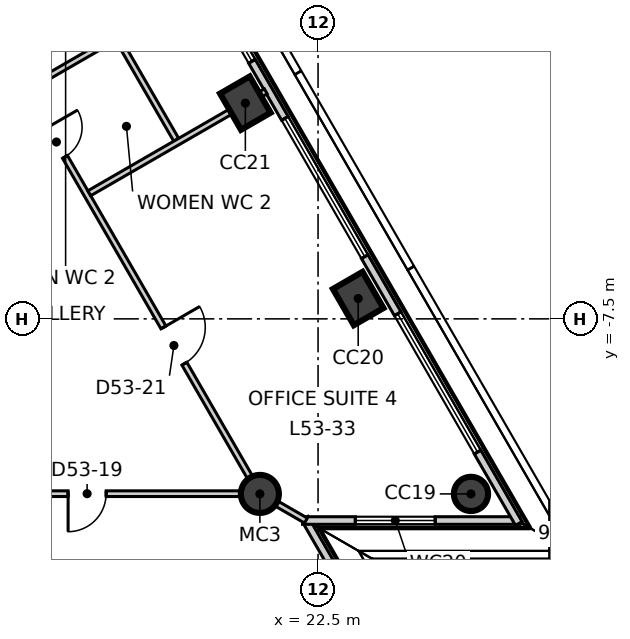
"""IFC4 building model, lengths in metres.
Left out: names, types, materials, properties, quantities, classifications, styles, units other than length and angle.
Written with IfcOpenShell. Run it as: python <this file> out.ifc"""

import sys

from ifc_helpers import new_model, si_unit, direction, frame, frame_2d, origin, origin_2d, place, context, subcontext, project, spatial, rectangle, circle, extrude, element, fill, save


model = new_model("IFC4")
c1 = context("Model", 3, precision=1e-05, world=origin(), true_north=direction((0.0, 1.0)))
c2 = subcontext(c1, "Body", "Model", "MODEL_VIEW")
j1 = project(units=[si_unit("LENGTHUNIT", "METRE"), si_unit("PLANEANGLEUNIT", "RADIAN")], contexts=[c1])
p1 = place(None, origin())
s1 = spatial("IfcSite", under=j1, at=p1, CompositionType="ELEMENT")
p2 = place(p1, origin())
s2 = spatial("IfcBuilding", under=s1, at=p2, CompositionType="ELEMENT")
p3 = place(p2, frame((0.0, 0.0, 227.3)))
s3 = spatial("IfcBuildingStorey", under=s2, at=p3, CompositionType="ELEMENT", Elevation=227.3)
p4 = place(p3, frame((26.524, -12.106, -0.3), z_axis=(0.0, 0.0, 1.0), x_axis=(-0.5, 0.866025403784, 0.0)))
e1 = element("IfcColumn", 1, at=p4, inside=s3, PredefinedType="COLUMN", context=c2, shape_type="SweptSolid", body=[
    extrude(circle(Radius=0.45, at=origin_2d()), origin(), (0.0, 0.0, 1.0), 4.0),
])
for number, where, z_axis, x_axis in (
    (2, (23.556, -6.965, -0.3), (0.0, 0.0, 1.0), (-0.5, 0.866, 0.0)),
    (3, (20.587, -1.824, -0.3), (0.0, 0.0, 1.0), (-0.5, 0.866, 0.0)),
):
    element("IfcColumn", number, at=place(p3, frame(where, z_axis=z_axis, x_axis=x_axis)), inside=s3, PredefinedType="COLUMN", context=c2, shape_type="SweptSolid", body=[
        extrude(rectangle(XDim=1.1, YDim=0.9, at=origin_2d()), origin(), (0.0, 0.0, 1.0), 4.0),
    ])
p5 = place(p3, frame((20.969, -12.106, -0.3), z_axis=(0.0, 0.0, 1.0), x_axis=(1.0, 0.0, 0.0)))
e4 = element("IfcColumn", 4, at=p5, inside=s3, PredefinedType="COLUMN", context=c2, shape_type="SweptSolid", body=[
    extrude(circle(Radius=0.5, at=origin_2d()), origin(), (0.0, 0.0, 1.0), 4.0),
])
p6 = place(p3, frame((25.004, -17.695, 0.0), z_axis=(0.0, 0.0, 1.0), x_axis=(-0.49987899677, 0.866095253761, 0.0)))
e5 = element("IfcWall", 5, at=p6, inside=s3, PredefinedType="ELEMENTEDWALL", context=c2, shape_type="SweptSolid", body=[
    extrude(rectangle(XDim=5.715, YDim=0.2, at=frame_2d((2.858, 0.0))), origin(), (0.0, 0.0, 1.0), 3.7),
])
p7 = place(p6, frame((1.99, 0.0, 0.9)))
e6 = element("IfcOpeningElement", 6, at=p7, cuts=e5, PredefinedType="OPENING", context=c2, shape_type="SweptSolid", body=[
    extrude(rectangle(XDim=2.1, YDim=2.5, at=frame_2d((1.05, 1.25))), frame((0.0, 0.11, 0.0), z_axis=(0.0, -1.0, 0.0), x_axis=(1.0, 0.0, 0.0)), (0.0, 0.0, 1.0), 0.22),
])
p8 = place(p3, frame((22.092, -12.806, 0.0), z_axis=(0.0, 0.0, 1.0), x_axis=(1.0, 0.0, 0.0)))
e7 = element("IfcWall", 7, at=p8, inside=s3, PredefinedType="ELEMENTEDWALL", context=c2, shape_type="SweptSolid", body=[
    extrude(rectangle(XDim=5.715, YDim=0.2, at=frame_2d((2.857, 0.0))), origin(), (0.0, 0.0, 1.0), 3.7),
])
p9 = place(p8, frame((1.39, 0.0, 0.9)))
e8 = element("IfcOpeningElement", 8, at=p9, cuts=e7, PredefinedType="OPENING", context=c2, shape_type="SweptSolid", body=[
    extrude(rectangle(XDim=2.1, YDim=2.5, at=frame_2d((1.05, 1.25))), frame((0.0, 0.11, 0.0), z_axis=(0.0, -1.0, 0.0), x_axis=(1.0, 0.0, 0.0)), (0.0, 0.0, 1.0), 0.22),
])
p10 = place(p3, frame((27.782, -12.884, 0.0), z_axis=(0.0, 0.0, 1.0), x_axis=(-0.500023345841, 0.866011924637, 0.0)))
e9 = element("IfcWall", 9, at=p10, inside=s3, PredefinedType="ELEMENTEDWALL", context=c2, shape_type="SweptSolid", body=[
    extrude(rectangle(XDim=50.078, YDim=0.2, at=frame_2d((25.039, 0.0))), origin(), (0.0, 0.0, 1.0), 3.7),
])
p11 = place(p10, frame((2.171, 0.0, 0.9)))
e10 = element("IfcOpeningElement", 10, at=p11, cuts=e9, PredefinedType="OPENING", context=c2, shape_type="SweptSolid", body=[
    extrude(rectangle(XDim=4.2, YDim=2.5, at=frame_2d((2.1, 1.25))), frame((0.0, 0.11, 0.0), z_axis=(0.0, -1.0, 0.0), x_axis=(1.0, 0.0, 0.0)), (0.0, 0.0, 1.0), 0.22),
])
p12 = place(p10, frame((8.108, 0.0, 0.9)))
e11 = element("IfcOpeningElement", 11, at=p12, cuts=e9, PredefinedType="OPENING", context=c2, shape_type="SweptSolid", body=[
    extrude(rectangle(XDim=4.2, YDim=2.5, at=frame_2d((2.1, 1.25))), frame((0.0, 0.11, 0.0), z_axis=(0.0, -1.0, 0.0), x_axis=(1.0, 0.0, 0.0)), (0.0, 0.0, 1.0), 0.22),
])
p13 = place(p10, frame((14.044, 0.0, 0.9)))
e12 = element("IfcOpeningElement", 12, at=p13, cuts=e9, PredefinedType="OPENING", context=c2, shape_type="SweptSolid", body=[
    extrude(rectangle(XDim=4.2, YDim=2.5, at=frame_2d((2.1, 1.25))), frame((0.0, 0.11, 0.0), z_axis=(0.0, -1.0, 0.0), x_axis=(1.0, 0.0, 0.0)), (0.0, 0.0, 1.0), 0.22),
])
p14 = place(p10, frame((19.981, 0.0, 0.9)))
e13 = element("IfcOpeningElement", 13, at=p14, cuts=e9, PredefinedType="OPENING", context=c2, shape_type="SweptSolid", body=[
    extrude(rectangle(XDim=4.2, YDim=2.5, at=frame_2d((2.1, 1.25))), frame((0.0, 0.11, 0.0), z_axis=(0.0, -1.0, 0.0), x_axis=(1.0, 0.0, 0.0)), (0.0, 0.0, 1.0), 0.22),
])
p15 = place(p10, frame((25.917, 0.0, 0.9)))
e14 = element("IfcOpeningElement", 14, at=p15, cuts=e9, PredefinedType="OPENING", context=c2, shape_type="SweptSolid", body=[
    extrude(rectangle(XDim=4.2, YDim=2.5, at=frame_2d((2.1, 1.25))), frame((0.0, 0.11, 0.0), z_axis=(0.0, -1.0, 0.0), x_axis=(1.0, 0.0, 0.0)), (0.0, 0.0, 1.0), 0.22),
])
p16 = place(p10, frame((31.854, 0.0, 0.9)))
e15 = element("IfcOpeningElement", 15, at=p16, cuts=e9, PredefinedType="OPENING", context=c2, shape_type="SweptSolid", body=[
    extrude(rectangle(XDim=4.2, YDim=2.5, at=frame_2d((2.1, 1.25))), frame((0.0, 0.11, 0.0), z_axis=(0.0, -1.0, 0.0), x_axis=(1.0, 0.0, 0.0)), (0.0, 0.0, 1.0), 0.22),
])
p17 = place(p10, frame((37.79, 0.0, 0.9)))
e16 = element("IfcOpeningElement", 16, at=p17, cuts=e9, PredefinedType="OPENING", context=c2, shape_type="SweptSolid", body=[
    extrude(rectangle(XDim=4.2, YDim=2.5, at=frame_2d((2.1, 1.25))), frame((0.0, 0.11, 0.0), z_axis=(0.0, -1.0, 0.0), x_axis=(1.0, 0.0, 0.0)), (0.0, 0.0, 1.0), 0.22),
])
p18 = place(p10, frame((43.727, 0.0, 0.9)))
e17 = element("IfcOpeningElement", 17, at=p18, cuts=e9, PredefinedType="OPENING", context=c2, shape_type="SweptSolid", body=[
    extrude(rectangle(XDim=4.2, YDim=2.5, at=frame_2d((2.1, 1.25))), frame((0.0, 0.11, 0.0), z_axis=(0.0, -1.0, 0.0), x_axis=(1.0, 0.0, 0.0)), (0.0, 0.0, 1.0), 0.22),
])
p19 = place(p3, frame((-20.808, -12.1, 0.0), z_axis=(0.0, 0.0, 1.0), x_axis=(1.0, 0.0, 0.0)))
e18 = element("IfcWall", 18, at=p19, inside=s3, PredefinedType="PARTITIONING", context=c2, shape_type="SweptSolid", body=[
    extrude(rectangle(XDim=41.766, YDim=0.15, at=frame_2d((20.883, 0.0))), origin(), (0.0, 0.0, 1.0), 3.7),
])
p20 = place(p19, frame((3.8, 0.0, 0.0)))
e19 = element("IfcOpeningElement", 19, at=p20, cuts=e18, PredefinedType="OPENING", context=c2, shape_type="SweptSolid", body=[
    extrude(rectangle(XDim=1.1, YDim=2.1, at=frame_2d((0.55, 1.05))), frame((0.0, 0.085, 0.0), z_axis=(0.0, -1.0, 0.0), x_axis=(1.0, 0.0, 0.0)), (0.0, 0.0, 1.0), 0.17),
])
p21 = place(p19, frame((18.685, 0.0, 0.0)))
e20 = element("IfcOpeningElement", 20, at=p21, cuts=e18, PredefinedType="OPENING", context=c2, shape_type="SweptSolid", body=[
    extrude(rectangle(XDim=1.1, YDim=2.1, at=frame_2d((0.55, 1.05))), frame((0.0, 0.085, 0.0), z_axis=(0.0, -1.0, 0.0), x_axis=(1.0, 0.0, 0.0)), (0.0, 0.0, 1.0), 0.17),
])
p22 = place(p19, frame((10.085, 0.0, 0.0)))
e21 = element("IfcOpeningElement", 21, at=p22, cuts=e18, PredefinedType="OPENING", context=c2, shape_type="SweptSolid", body=[
    extrude(rectangle(XDim=0.9, YDim=2.1, at=frame_2d((0.45, 1.05))), frame((0.0, 0.085, 0.0), z_axis=(0.0, -1.0, 0.0), x_axis=(1.0, 0.0, 0.0)), (0.0, 0.0, 1.0), 0.17),
])
p23 = place(p19, frame((13.285, 0.0, 0.0)))
e22 = element("IfcOpeningElement", 22, at=p23, cuts=e18, PredefinedType="OPENING", context=c2, shape_type="SweptSolid", body=[
    extrude(rectangle(XDim=0.9, YDim=2.1, at=frame_2d((0.45, 1.05))), frame((0.0, 0.085, 0.0), z_axis=(0.0, -1.0, 0.0), x_axis=(1.0, 0.0, 0.0)), (0.0, 0.0, 1.0), 0.17),
])
p24 = place(p19, frame((15.985, 0.0, 0.0)))
e23 = element("IfcOpeningElement", 23, at=p24, cuts=e18, PredefinedType="OPENING", context=c2, shape_type="SweptSolid", body=[
    extrude(rectangle(XDim=1.0, YDim=2.1, at=frame_2d((0.5, 1.05))), frame((0.0, 0.085, 0.0), z_axis=(0.0, -1.0, 0.0), x_axis=(1.0, 0.0, 0.0)), (0.0, 0.0, 1.0), 0.17),
])
p25 = place(p19, frame((29.158, 0.0, 0.0)))
e24 = element("IfcOpeningElement", 24, at=p25, cuts=e18, PredefinedType="OPENING", context=c2, shape_type="SweptSolid", body=[
    extrude(rectangle(XDim=1.1, YDim=2.1, at=frame_2d((0.55, 1.05))), frame((0.0, 0.085, 0.0), z_axis=(0.0, -1.0, 0.0), x_axis=(1.0, 0.0, 0.0)), (0.0, 0.0, 1.0), 0.17),
])
p26 = place(p19, frame((22.158, 0.0, 0.0)))
e25 = element("IfcOpeningElement", 25, at=p26, cuts=e18, PredefinedType="OPENING", context=c2, shape_type="SweptSolid", body=[
    extrude(rectangle(XDim=0.9, YDim=2.1, at=frame_2d((0.45, 1.05))), frame((0.0, 0.085, 0.0), z_axis=(0.0, -1.0, 0.0), x_axis=(1.0, 0.0, 0.0)), (0.0, 0.0, 1.0), 0.17),
])
p27 = place(p19, frame((25.158, 0.0, 0.0)))
e26 = element("IfcOpeningElement", 26, at=p27, cuts=e18, PredefinedType="OPENING", context=c2, shape_type="SweptSolid", body=[
    extrude(rectangle(XDim=0.9, YDim=2.1, at=frame_2d((0.45, 1.05))), frame((0.0, 0.085, 0.0), z_axis=(0.0, -1.0, 0.0), x_axis=(1.0, 0.0, 0.0)), (0.0, 0.0, 1.0), 0.17),
])
p28 = place(p19, frame((36.731, 0.0, 0.0)))
e27 = element("IfcOpeningElement", 27, at=p28, cuts=e18, PredefinedType="OPENING", context=c2, shape_type="SweptSolid", body=[
    extrude(rectangle(XDim=1.0, YDim=2.1, at=frame_2d((0.5, 1.05))), frame((0.0, 0.085, 0.0), z_axis=(0.0, -1.0, 0.0), x_axis=(1.0, 0.0, 0.0)), (0.0, 0.0, 1.0), 0.17),
])
p29 = place(p3, frame((21.086, -12.175, 0.0), z_axis=(0.0, 0.0, 1.0), x_axis=(0.866143786764, -0.499794898583, 0.0)))
e28 = element("IfcWall", 28, at=p29, inside=s3, PredefinedType="PARTITIONING", context=c2, shape_type="SweptSolid", body=[
    extrude(rectangle(XDim=1.264, YDim=0.15, at=frame_2d((0.632, 0.0))), origin(), (0.0, 0.0, 1.0), 3.7),
])
p30 = place(p3, frame((0.075, 24.07, 0.0), z_axis=(0.0, 0.0, 1.0), x_axis=(0.49999939571, -0.866025752671, 0.0)))
e29 = element("IfcWall", 29, at=p30, inside=s3, PredefinedType="PARTITIONING", context=c2, shape_type="SweptSolid", body=[
    extrude(rectangle(XDim=41.614, YDim=0.15, at=frame_2d((20.807, 0.0))), origin(), (0.0, 0.0, 1.0), 3.7),
])
p31 = place(p30, frame((36.714, 0.0, 0.0)))
e30 = element("IfcOpeningElement", 30, at=p31, cuts=e29, PredefinedType="OPENING", context=c2, shape_type="SweptSolid", body=[
    extrude(rectangle(XDim=1.1, YDim=2.1, at=frame_2d((0.55, 1.05))), frame((0.0, 0.085, 0.0), z_axis=(0.0, -1.0, 0.0), x_axis=(1.0, 0.0, 0.0)), (0.0, 0.0, 1.0), 0.17),
])
p32 = place(p30, frame((21.831, 0.0, 0.0)))
e31 = element("IfcOpeningElement", 31, at=p32, cuts=e29, PredefinedType="OPENING", context=c2, shape_type="SweptSolid", body=[
    extrude(rectangle(XDim=1.1, YDim=2.1, at=frame_2d((0.55, 1.05))), frame((0.0, 0.085, 0.0), z_axis=(0.0, -1.0, 0.0), x_axis=(1.0, 0.0, 0.0)), (0.0, 0.0, 1.0), 0.17),
])
p33 = place(p30, frame((30.631, 0.0, 0.0)))
e32 = element("IfcOpeningElement", 32, at=p33, cuts=e29, PredefinedType="OPENING", context=c2, shape_type="SweptSolid", body=[
    extrude(rectangle(XDim=0.9, YDim=2.1, at=frame_2d((0.45, 1.05))), frame((0.0, 0.085, 0.0), z_axis=(0.0, -1.0, 0.0), x_axis=(1.0, 0.0, 0.0)), (0.0, 0.0, 1.0), 0.17),
])
p34 = place(p30, frame((27.431, 0.0, 0.0)))
e33 = element("IfcOpeningElement", 33, at=p34, cuts=e29, PredefinedType="OPENING", context=c2, shape_type="SweptSolid", body=[
    extrude(rectangle(XDim=0.9, YDim=2.1, at=frame_2d((0.45, 1.05))), frame((0.0, 0.085, 0.0), z_axis=(0.0, -1.0, 0.0), x_axis=(1.0, 0.0, 0.0)), (0.0, 0.0, 1.0), 0.17),
])
p35 = place(p30, frame((24.631, 0.0, 0.0)))
e34 = element("IfcOpeningElement", 34, at=p35, cuts=e29, PredefinedType="OPENING", context=c2, shape_type="SweptSolid", body=[
    extrude(rectangle(XDim=1.0, YDim=2.1, at=frame_2d((0.5, 1.05))), frame((0.0, 0.085, 0.0), z_axis=(0.0, -1.0, 0.0), x_axis=(1.0, 0.0, 0.0)), (0.0, 0.0, 1.0), 0.17),
])
p36 = place(p30, frame((14.358, 0.0, 0.0)))
e35 = element("IfcOpeningElement", 35, at=p36, cuts=e29, PredefinedType="OPENING", context=c2, shape_type="SweptSolid", body=[
    extrude(rectangle(XDim=1.1, YDim=2.1, at=frame_2d((0.55, 1.05))), frame((0.0, 0.085, 0.0), z_axis=(0.0, -1.0, 0.0), x_axis=(1.0, 0.0, 0.0)), (0.0, 0.0, 1.0), 0.17),
])
p37 = place(p30, frame((3.885, 0.0, 0.0)))
e36 = element("IfcOpeningElement", 36, at=p37, cuts=e29, PredefinedType="OPENING", context=c2, shape_type="SweptSolid", body=[
    extrude(rectangle(XDim=1.1, YDim=2.1, at=frame_2d((0.55, 1.05))), frame((0.0, 0.085, 0.0), z_axis=(0.0, -1.0, 0.0), x_axis=(1.0, 0.0, 0.0)), (0.0, 0.0, 1.0), 0.17),
])
p38 = place(p3, frame((14.404, 4.768, 0.0), z_axis=(0.0, 0.0, 1.0), x_axis=(0.500042162787, -0.86600105972, 0.0)))
e37 = element("IfcWall", 37, at=p38, inside=s3, PredefinedType="PARTITIONING", context=c2, shape_type="SweptSolid", body=[
    extrude(rectangle(XDim=8.725, YDim=0.15, at=frame_2d((4.363, 0.0))), origin(), (0.0, 0.0, 1.0), 3.7),
])
p39 = place(p3, frame((14.88, -1.424, 0.0), z_axis=(0.0, 0.0, 1.0), x_axis=(0.865872279416, 0.500265125447, 0.0)))
e38 = element("IfcWall", 38, at=p39, inside=s3, PredefinedType="PARTITIONING", context=c2, shape_type="SweptSolid", body=[
    extrude(rectangle(XDim=2.609, YDim=0.15, at=frame_2d((1.304, 0.0))), origin(), (0.0, 0.0, 1.0), 3.7),
])
p40 = place(p3, frame((16.48, -4.195, 0.0), z_axis=(0.0, 0.0, 1.0), x_axis=(0.866032438121, 0.499987815973, 0.0)))
e39 = element("IfcWall", 39, at=p40, inside=s3, PredefinedType="PARTITIONING", context=c2, shape_type="SweptSolid", body=[
    extrude(rectangle(XDim=5.363, YDim=0.15, at=frame_2d((2.681, 0.0))), origin(), (0.0, 0.0, 1.0), 3.7),
])
p41 = place(p9, origin())
e40 = element("IfcWindow", 40, at=p41, inside=s3, PartitioningType="SINGLE_PANEL", PredefinedType="WINDOW", context=c2, shape_type="SweptSolid", body=[
    extrude(rectangle(XDim=2.1, YDim=2.5, at=frame_2d((1.05, 1.25))), frame((0.0, 0.03, 0.0), z_axis=(0.0, -1.0, 0.0), x_axis=(1.0, 0.0, 0.0)), (0.0, 0.0, 1.0), 0.06),
])
fill(e8, e40)
p42 = place(p11, origin())
e41 = element("IfcWindow", 41, at=p42, inside=s3, PartitioningType="SINGLE_PANEL", PredefinedType="WINDOW", context=c2, shape_type="SweptSolid", body=[
    extrude(rectangle(XDim=4.2, YDim=2.5, at=frame_2d((2.1, 1.25))), frame((0.0, 0.03, 0.0), z_axis=(0.0, -1.0, 0.0), x_axis=(1.0, 0.0, 0.0)), (0.0, 0.0, 1.0), 0.06),
])
fill(e10, e41)
p43 = place(p12, origin())
e42 = element("IfcWindow", 42, at=p43, inside=s3, PartitioningType="SINGLE_PANEL", PredefinedType="WINDOW", context=c2, shape_type="SweptSolid", body=[
    extrude(rectangle(XDim=4.2, YDim=2.5, at=frame_2d((2.1, 1.25))), frame((0.0, 0.03, 0.0), z_axis=(0.0, -1.0, 0.0), x_axis=(1.0, 0.0, 0.0)), (0.0, 0.0, 1.0), 0.06),
])
fill(e11, e42)
p44 = place(p13, origin())
e43 = element("IfcWindow", 43, at=p44, inside=s3, PartitioningType="SINGLE_PANEL", PredefinedType="WINDOW", context=c2, shape_type="SweptSolid", body=[
    extrude(rectangle(XDim=4.2, YDim=2.5, at=frame_2d((2.1, 1.25))), frame((0.0, 0.03, 0.0), z_axis=(0.0, -1.0, 0.0), x_axis=(1.0, 0.0, 0.0)), (0.0, 0.0, 1.0), 0.06),
])
fill(e12, e43)
p45 = place(p28, origin())
e44 = element("IfcDoor", 44, at=p45, inside=s3, OperationType="SINGLE_SWING_LEFT", PredefinedType="DOOR", context=c2, shape_type="SweptSolid", body=[
    extrude(rectangle(XDim=1.0, YDim=2.1, at=frame_2d((0.5, 1.05))), frame((0.0, 0.025, 0.0), z_axis=(0.0, -1.0, 0.0), x_axis=(1.0, 0.0, 0.0)), (0.0, 0.0, 1.0), 0.05),
])
fill(e27, e44)
p46 = place(p31, origin())
e45 = element("IfcDoor", 45, at=p46, inside=s3, OperationType="SINGLE_SWING_RIGHT", PredefinedType="DOOR", context=c2, shape_type="SweptSolid", body=[
    extrude(rectangle(XDim=1.1, YDim=2.1, at=frame_2d((0.55, 1.05))), frame((0.0, 0.025, 0.0), z_axis=(0.0, -1.0, 0.0), x_axis=(1.0, 0.0, 0.0)), (0.0, 0.0, 1.0), 0.05),
])
fill(e30, e45)
p47 = place(p33, origin())
e46 = element("IfcDoor", 46, at=p47, inside=s3, OperationType="SINGLE_SWING_RIGHT", PredefinedType="DOOR", context=c2, shape_type="SweptSolid", body=[
    extrude(rectangle(XDim=0.9, YDim=2.1, at=frame_2d((0.45, 1.05))), frame((0.0, 0.025, 0.0), z_axis=(0.0, -1.0, 0.0), x_axis=(1.0, 0.0, 0.0)), (0.0, 0.0, 1.0), 0.05),
])
fill(e32, e46)
save(model, sys.argv[1])
